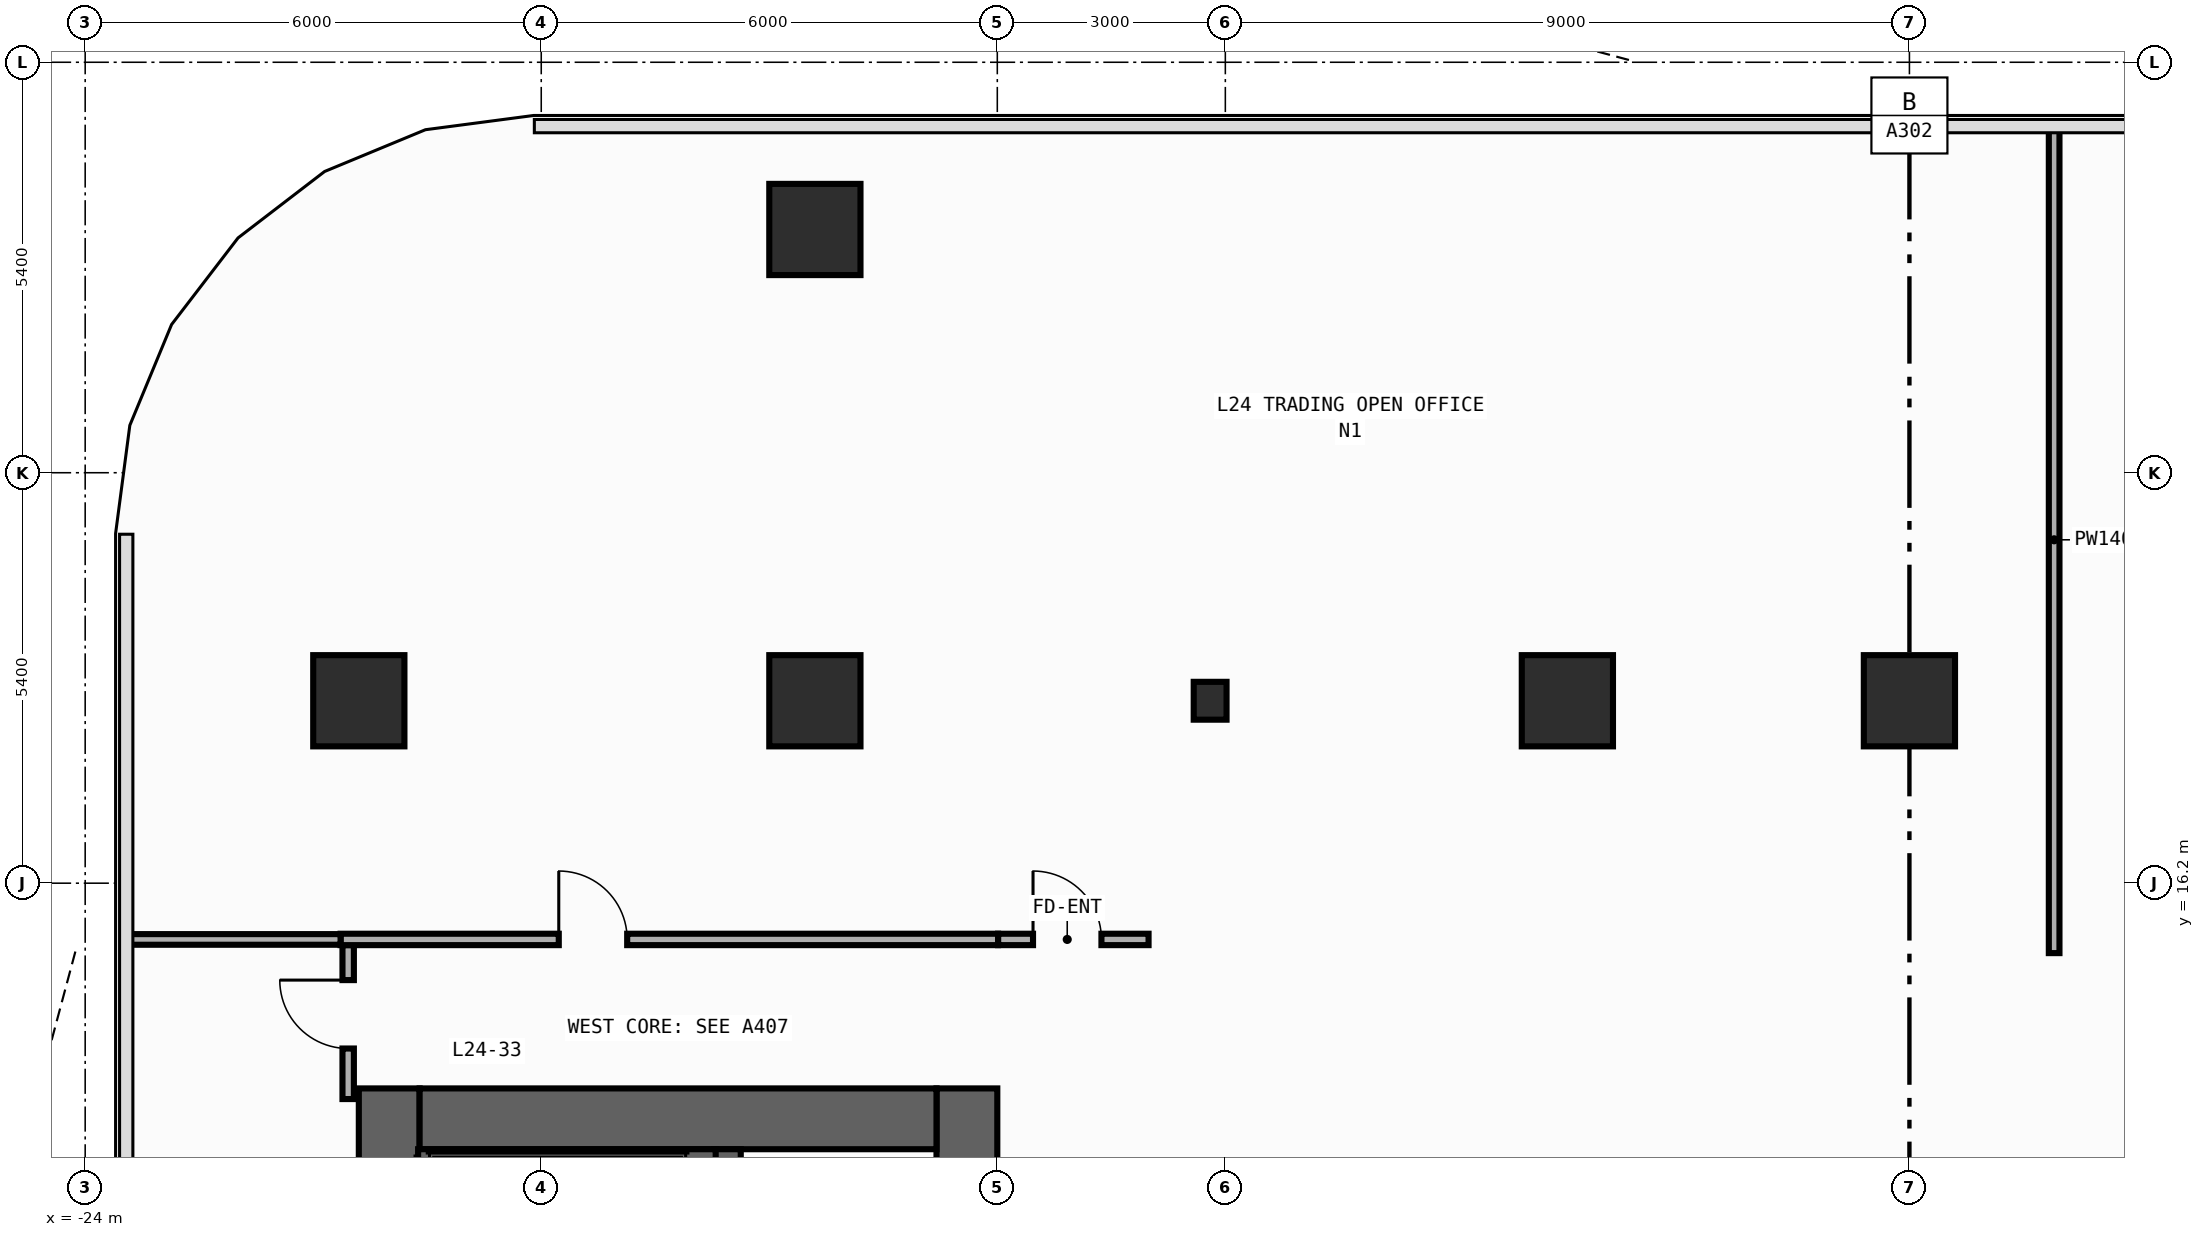
"""IFC4 building model, lengths in metres.
Left out: names, types, materials, properties, quantities, classifications, styles, units other than length and angle.
Written with IfcOpenShell. Run it as: python <this file> out.ifc"""

import sys

from ifc_helpers import new_model, si_unit, direction, frame, frame_2d, origin, origin_2d, place, context, subcontext, project, spatial, rectangle, i_section, extrude, element, fill, save


model = new_model("IFC4")
c1 = context("Model", 3, precision=1e-05, world=origin(), true_north=direction((0.0, 1.0)))
c2 = subcontext(c1, "Body", "Model", "MODEL_VIEW")
j1 = project(units=[si_unit("LENGTHUNIT", "METRE"), si_unit("PLANEANGLEUNIT", "RADIAN")], contexts=[c1])
p1 = place(None, origin())
s1 = spatial("IfcSite", under=j1, at=p1, CompositionType="ELEMENT")
p2 = place(p1, origin())
s2 = spatial("IfcBuilding", under=s1, at=p2, CompositionType="ELEMENT")
p3 = place(p2, frame((0.0, 0.0, 105.8)))
s3 = spatial("IfcBuildingStorey", under=s2, at=p3, CompositionType="ELEMENT", Elevation=105.8)
p4 = place(p3, frame((-20.0, -13.5, 0.0), z_axis=(0.0, 0.0, 1.0), x_axis=(0.0, 1.0, 0.0)))
e1 = element("IfcWall", 1, at=p4, inside=s3, PredefinedType="SHEAR", context=c2, shape_type="SweptSolid", body=[
    extrude(rectangle(XDim=27.0, YDim=0.8, at=frame_2d((13.5, 0.0))), origin(), (0.0, 0.0, 1.0), 3.94),
])
p5 = place(p3, frame((-12.4, -13.5, 0.0), z_axis=(0.0, 0.0, 1.0), x_axis=(0.0, 1.0, 0.0)))
e2 = element("IfcWall", 2, at=p5, inside=s3, PredefinedType="SHEAR", context=c2, shape_type="SweptSolid", body=[
    extrude(rectangle(XDim=27.0, YDim=0.8, at=frame_2d((13.5, 0.0))), origin(), (0.0, 0.0, 1.0), 3.94),
])
p6 = place(p5, frame((10.35, 0.0, 0.0)))
e3 = element("IfcOpeningElement", 3, at=p6, cuts=e2, PredefinedType="OPENING", context=c2, shape_type="SweptSolid", body=[
    extrude(rectangle(XDim=1.1, YDim=2.2, at=frame_2d((0.55, 1.1))), frame((0.0, 0.41, 0.0), z_axis=(0.0, -1.0, 0.0), x_axis=(1.0, 0.0, 0.0)), (0.0, 0.0, 1.0), 0.82),
])
p7 = place(p5, frame((7.15, 0.0, 0.0)))
e4 = element("IfcOpeningElement", 4, at=p7, cuts=e2, PredefinedType="OPENING", context=c2, shape_type="SweptSolid", body=[
    extrude(rectangle(XDim=1.1, YDim=2.2, at=frame_2d((0.55, 1.1))), frame((0.0, 0.41, 0.0), z_axis=(0.0, -1.0, 0.0), x_axis=(1.0, 0.0, 0.0)), (0.0, 0.0, 1.0), 0.82),
])
p8 = place(p5, frame((3.95, 0.0, 0.0)))
e5 = element("IfcOpeningElement", 5, at=p8, cuts=e2, PredefinedType="OPENING", context=c2, shape_type="SweptSolid", body=[
    extrude(rectangle(XDim=1.1, YDim=2.2, at=frame_2d((0.55, 1.1))), frame((0.0, 0.41, 0.0), z_axis=(0.0, -1.0, 0.0), x_axis=(1.0, 0.0, 0.0)), (0.0, 0.0, 1.0), 0.82),
])
p9 = place(p5, frame((15.175, 0.0, 0.0)))
e6 = element("IfcOpeningElement", 6, at=p9, cuts=e2, PredefinedType="OPENING", context=c2, shape_type="SweptSolid", body=[
    extrude(rectangle(XDim=0.85, YDim=2.1, at=frame_2d((0.425, 1.05))), frame((0.0, 0.41, 0.0), z_axis=(0.0, -1.0, 0.0), x_axis=(1.0, 0.0, 0.0)), (0.0, 0.0, 1.0), 0.82),
])
p10 = place(p5, frame((21.275, 0.0, 0.0)))
e7 = element("IfcOpeningElement", 7, at=p10, cuts=e2, PredefinedType="OPENING", context=c2, shape_type="SweptSolid", body=[
    extrude(rectangle(XDim=0.85, YDim=2.1, at=frame_2d((0.425, 1.05))), frame((0.0, 0.41, 0.0), z_axis=(0.0, -1.0, 0.0), x_axis=(1.0, 0.0, 0.0)), (0.0, 0.0, 1.0), 0.82),
])
p11 = place(p5, frame((12.725, 0.0, 0.0)))
e8 = element("IfcOpeningElement", 8, at=p11, cuts=e2, PredefinedType="OPENING", context=c2, shape_type="SweptSolid", body=[
    extrude(rectangle(XDim=1.15, YDim=2.2, at=frame_2d((0.575, 1.1))), frame((0.0, 0.41, 0.0), z_axis=(0.0, -1.0, 0.0), x_axis=(1.0, 0.0, 0.0)), (0.0, 0.0, 1.0), 0.82),
])
p12 = place(p5, frame((1.625, 0.0, 0.0)))
e9 = element("IfcOpeningElement", 9, at=p12, cuts=e2, PredefinedType="OPENING", context=c2, shape_type="SweptSolid", body=[
    extrude(rectangle(XDim=0.85, YDim=2.1, at=frame_2d((0.425, 1.05))), frame((0.0, 0.41, 0.0), z_axis=(0.0, -1.0, 0.0), x_axis=(1.0, 0.0, 0.0)), (0.0, 0.0, 1.0), 0.82),
])
p13 = place(p3, frame((-19.6, 13.1, 0.0), z_axis=(0.0, 0.0, 1.0), x_axis=(1.0, 0.0, 0.0)))
e10 = element("IfcWall", 10, at=p13, inside=s3, PredefinedType="SHEAR", context=c2, shape_type="SweptSolid", body=[
    extrude(rectangle(XDim=6.8, YDim=0.8, at=frame_2d((3.4, 0.0))), origin(), (0.0, 0.0, 1.0), 3.94),
])
p14 = place(p3, frame((-15.55, -12.7, 0.0), z_axis=(0.0, 0.0, 1.0), x_axis=(0.0, 1.0, 0.0)))
e11 = element("IfcWall", 11, at=p14, inside=s3, PredefinedType="SHEAR", context=c2, shape_type="SweptSolid", body=[
    extrude(rectangle(XDim=25.4, YDim=0.35, at=frame_2d((12.7, 0.0))), origin(), (0.0, 0.0, 1.0), 3.94),
])
p15 = place(p14, frame((11.925, 0.0, 0.0)))
e12 = element("IfcOpeningElement", 12, at=p15, cuts=e11, PredefinedType="OPENING", context=c2, shape_type="SweptSolid", body=[
    extrude(rectangle(XDim=1.15, YDim=2.2, at=frame_2d((0.575, 1.1))), frame((0.0, 0.185, 0.0), z_axis=(0.0, -1.0, 0.0), x_axis=(1.0, 0.0, 0.0)), (0.0, 0.0, 1.0), 0.37),
])
p16 = place(p14, frame((0.825, 0.0, 0.0)))
e13 = element("IfcOpeningElement", 13, at=p16, cuts=e11, PredefinedType="OPENING", context=c2, shape_type="SweptSolid", body=[
    extrude(rectangle(XDim=0.85, YDim=2.1, at=frame_2d((0.425, 1.05))), frame((0.0, 0.185, 0.0), z_axis=(0.0, -1.0, 0.0), x_axis=(1.0, 0.0, 0.0)), (0.0, 0.0, 1.0), 0.37),
])
p17 = place(p3, frame((-19.62, 12.59, 0.0), z_axis=(0.0, 0.0, 1.0), x_axis=(1.0, 0.0, 0.0)))
e14 = element("IfcWall", 14, at=p17, inside=s3, PredefinedType="SHEAR", context=c2, shape_type="SweptSolid", body=[
    extrude(rectangle(XDim=3.915, YDim=0.22, at=frame_2d((1.958, 0.0))), origin(), (0.0, 0.0, 1.0), 3.94),
])
p18 = place(p3, frame((-9.2, 18.6, 0.0), z_axis=(0.0, 0.0, 1.0), x_axis=(1.0, 0.0, 0.0)))
e15 = element("IfcColumn", 15, at=p18, inside=s3, PredefinedType="COLUMN", context=c2, shape_type="SweptSolid", body=[
    extrude(i_section(OverallWidth=0.432, OverallDepth=0.498, WebThickness=0.045, FlangeThickness=0.07, FilletRadius=0.022, at=origin_2d()), origin(), (0.0, 0.0, 1.0), 4.2),
])
for number, where, z_axis, x_axis in (
    (16, (-20.4, 18.6, 0.0), (0.0, 0.0, 1.0), (1.0, 0.0, 0.0)),
    (17, (-14.4, 18.6, 0.0), (0.0, 0.0, 1.0), (1.0, 0.0, 0.0)),
    (18, (-4.5, 18.6, 0.0), (0.0, 0.0, 1.0), (1.0, 0.0, 0.0)),
    (19, (0.0, 18.6, 0.0), (0.0, 0.0, 1.0), (1.0, 0.0, 0.0)),
    (20, (-14.4, 24.8, 0.0), (0.0, 0.0, 1.0), (1.0, 0.0, 0.0)),
):
    element("IfcColumn", number, at=place(p3, frame(where, z_axis=z_axis, x_axis=x_axis)), inside=s3, PredefinedType="COLUMN", context=c2, shape_type="SweptSolid", body=[
        extrude(rectangle(XDim=1.2, YDim=1.2, at=origin_2d()), origin(), (0.0, 0.0, 1.0), 4.2),
    ])
p19 = place(p3, frame((-11.99, 15.46, 0.0), z_axis=(0.0, 0.0, 1.0), x_axis=(1.0, 0.0, 0.0)))
e21 = element("IfcWall", 21, at=p19, inside=s3, PredefinedType="PARTITIONING", context=c2, shape_type="SweptSolid", body=[
    extrude(rectangle(XDim=1.98, YDim=0.15, at=frame_2d((0.99, 0.0))), origin(), (0.0, 0.0, 1.0), 3.94),
])
p20 = place(p19, frame((0.46, 0.0, 0.0)))
e22 = element("IfcOpeningElement", 22, at=p20, cuts=e21, PredefinedType="OPENING", context=c2, shape_type="SweptSolid", body=[
    extrude(rectangle(XDim=0.9, YDim=2.15, at=frame_2d((0.45, 1.075))), frame((0.0, 0.085, 0.0), z_axis=(0.0, -1.0, 0.0), x_axis=(1.0, 0.0, 0.0)), (0.0, 0.0, 1.0), 0.17),
])
p21 = place(p3, frame((-20.54, 13.36, 0.0), z_axis=(0.0, 0.0, 1.0), x_axis=(0.0, 1.0, 0.0)))
e23 = element("IfcWall", 23, at=p21, inside=s3, PredefinedType="PARTITIONING", context=c2, shape_type="SweptSolid", body=[
    extrude(rectangle(XDim=2.025, YDim=0.15, at=frame_2d((1.012, 0.0))), origin(), (0.0, 0.0, 1.0), 3.94),
])
p22 = place(p21, frame((0.665, 0.0, 0.0)))
e24 = element("IfcOpeningElement", 24, at=p22, cuts=e23, PredefinedType="OPENING", context=c2, shape_type="SweptSolid", body=[
    extrude(rectangle(XDim=0.9, YDim=2.15, at=frame_2d((0.45, 1.075))), frame((0.0, 0.085, 0.0), z_axis=(0.0, -1.0, 0.0), x_axis=(1.0, 0.0, 0.0)), (0.0, 0.0, 1.0), 0.17),
])
p23 = place(p3, frame((-20.64, 15.46, 0.0), z_axis=(0.0, 0.0, 1.0), x_axis=(1.0, 0.0, 0.0)))
e25 = element("IfcWall", 25, at=p23, inside=s3, PredefinedType="PARTITIONING", context=c2, shape_type="SweptSolid", body=[
    extrude(rectangle(XDim=8.65, YDim=0.15, at=frame_2d((4.325, 0.0))), origin(), (0.0, 0.0, 1.0), 3.94),
])
p24 = place(p23, frame((2.871, 0.0, 0.0)))
e26 = element("IfcOpeningElement", 26, at=p24, cuts=e25, PredefinedType="OPENING", context=c2, shape_type="SweptSolid", body=[
    extrude(rectangle(XDim=0.9, YDim=2.15, at=frame_2d((0.45, 1.075))), frame((0.0, 0.085, 0.0), z_axis=(0.0, -1.0, 0.0), x_axis=(1.0, 0.0, 0.0)), (0.0, 0.0, 1.0), 0.17),
])
p25 = place(p3, frame((-23.455, 15.46, 0.0), z_axis=(0.0, 0.0, 1.0), x_axis=(1.0, 0.0, 0.0)))
e27 = element("IfcWall", 27, at=p25, inside=s3, PredefinedType="PARTITIONING", context=c2, shape_type="SweptSolid", body=[
    extrude(rectangle(XDim=2.815, YDim=0.14, at=frame_2d((1.408, 0.0))), origin(), (0.0, 0.0, 1.0), 3.94),
])
p26 = place(p3, frame((1.904, 15.28, 0.0), z_axis=(0.0, 0.0, 1.0), x_axis=(0.0, 1.0, 0.0)))
e28 = element("IfcWall", 28, at=p26, inside=s3, PredefinedType="PARTITIONING", context=c2, shape_type="SweptSolid", body=[
    extrude(rectangle(XDim=10.875, YDim=0.14, at=frame_2d((5.438, 0.0))), origin(), (0.0, 0.0, 1.0), 3.94),
])
p27 = place(p20, origin())
e29 = element("IfcDoor", 29, at=p27, inside=s3, OperationType="SINGLE_SWING_LEFT", PredefinedType="DOOR", context=c2, shape_type="SweptSolid", body=[
    extrude(rectangle(XDim=0.9, YDim=2.15, at=frame_2d((0.45, 1.075))), frame((0.0, 0.025, 0.0), z_axis=(0.0, -1.0, 0.0), x_axis=(1.0, 0.0, 0.0)), (0.0, 0.0, 1.0), 0.05),
])
fill(e22, e29)
p28 = place(p22, origin())
e30 = element("IfcDoor", 30, at=p28, inside=s3, OperationType="SINGLE_SWING_RIGHT", PredefinedType="DOOR", context=c2, shape_type="SweptSolid", body=[
    extrude(rectangle(XDim=0.9, YDim=2.15, at=frame_2d((0.45, 1.075))), frame((0.0, 0.025, 0.0), z_axis=(0.0, -1.0, 0.0), x_axis=(1.0, 0.0, 0.0)), (0.0, 0.0, 1.0), 0.05),
])
fill(e24, e30)
p29 = place(p24, origin())
e31 = element("IfcDoor", 31, at=p29, inside=s3, OperationType="SINGLE_SWING_LEFT", PredefinedType="DOOR", context=c2, shape_type="SweptSolid", body=[
    extrude(rectangle(XDim=0.9, YDim=2.15, at=frame_2d((0.45, 1.075))), frame((0.0, 0.025, 0.0), z_axis=(0.0, -1.0, 0.0), x_axis=(1.0, 0.0, 0.0)), (0.0, 0.0, 1.0), 0.05),
])
fill(e26, e31)
save(model, sys.argv[1])
